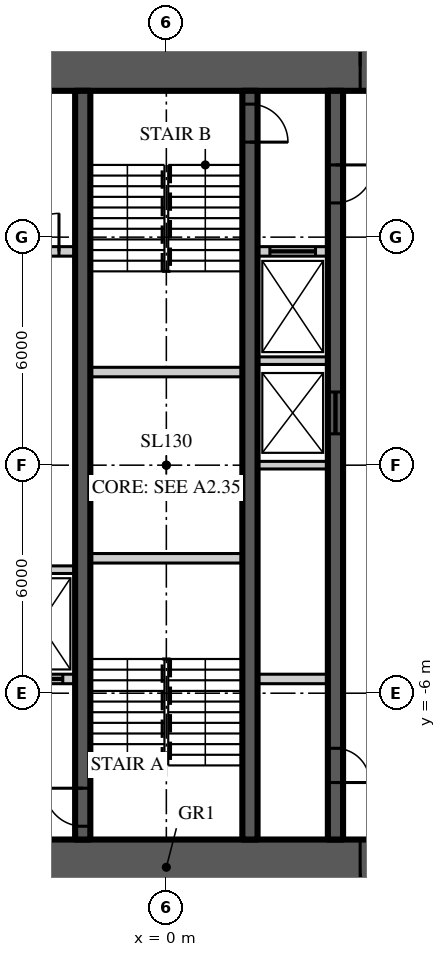
"""IFC4 building model, lengths in metres.
Left out: names, types, materials, properties, quantities, classifications, styles, units other than length and angle.
Written with IfcOpenShell. Run it as: python <this file> out.ifc"""

import sys

from ifc_helpers import new_model, si_unit, direction, frame, frame_2d, origin, place, context, subcontext, project, spatial, rectangle, extrude, element, fill, save


model = new_model("IFC4")
c1 = context("Model", 3, precision=1e-05, world=origin(), true_north=direction((0.0, 1.0)))
c2 = subcontext(c1, "Body", "Model", "MODEL_VIEW")
j1 = project(units=[si_unit("LENGTHUNIT", "METRE"), si_unit("PLANEANGLEUNIT", "RADIAN")], contexts=[c1])
p1 = place(None, origin())
s1 = spatial("IfcSite", under=j1, at=p1, CompositionType="ELEMENT")
p2 = place(p1, origin())
s2 = spatial("IfcBuilding", under=s1, at=p2, CompositionType="ELEMENT")
p3 = place(p2, frame((0.0, 0.0, 271.2)))
s3 = spatial("IfcBuildingStorey", under=s2, at=p3, CompositionType="ELEMENT", Elevation=271.2)
p4 = place(p3, frame((-11.15, 10.5, 0.0), z_axis=(0.0, 0.0, 1.0), x_axis=(1.0, 0.0, 0.0)))
e1 = element("IfcWall", 1, at=p4, inside=s3, PredefinedType="SHEAR", context=c2, shape_type="SweptSolid", body=[
    extrude(rectangle(XDim=22.3, YDim=1.3, at=frame_2d((11.15, 0.0))), origin(), (0.0, 0.0, 1.0), 3.9),
])
p5 = place(p4, frame((4.25, 0.0, 0.0)))
e2 = element("IfcOpeningElement", 2, at=p5, cuts=e1, PredefinedType="OPENING", context=c2, shape_type="SweptSolid", body=[
    extrude(rectangle(XDim=1.8, YDim=2.2, at=frame_2d((0.9, 1.1))), frame((0.0, 0.66, 0.0), z_axis=(0.0, -1.0, 0.0), x_axis=(1.0, 0.0, 0.0)), (0.0, 0.0, 1.0), 1.32),
])
p6 = place(p4, frame((16.25, 0.0, 0.0)))
e3 = element("IfcOpeningElement", 3, at=p6, cuts=e1, PredefinedType="OPENING", context=c2, shape_type="SweptSolid", body=[
    extrude(rectangle(XDim=1.8, YDim=2.2, at=frame_2d((0.9, 1.1))), frame((0.0, 0.66, 0.0), z_axis=(0.0, -1.0, 0.0), x_axis=(1.0, 0.0, 0.0)), (0.0, 0.0, 1.0), 1.32),
])
p7 = place(p3, frame((11.15, -10.5, 0.0), z_axis=(0.0, 0.0, 1.0), x_axis=(-1.0, 0.0, 0.0)))
e4 = element("IfcWall", 4, at=p7, inside=s3, PredefinedType="SHEAR", context=c2, shape_type="SweptSolid", body=[
    extrude(rectangle(XDim=22.3, YDim=1.3, at=frame_2d((11.15, 0.0))), origin(), (0.0, 0.0, 1.0), 3.9),
])
p8 = place(p7, frame((16.25, 0.0, 0.0)))
e5 = element("IfcOpeningElement", 5, at=p8, cuts=e4, PredefinedType="OPENING", context=c2, shape_type="SweptSolid", body=[
    extrude(rectangle(XDim=1.8, YDim=2.2, at=frame_2d((0.9, 1.1))), frame((0.0, 0.66, 0.0), z_axis=(0.0, -1.0, 0.0), x_axis=(1.0, 0.0, 0.0)), (0.0, 0.0, 1.0), 1.32),
])
p9 = place(p7, frame((4.25, 0.0, 0.0)))
e6 = element("IfcOpeningElement", 6, at=p9, cuts=e4, PredefinedType="OPENING", context=c2, shape_type="SweptSolid", body=[
    extrude(rectangle(XDim=1.8, YDim=2.2, at=frame_2d((0.9, 1.1))), frame((0.0, 0.66, 0.0), z_axis=(0.0, -1.0, 0.0), x_axis=(1.0, 0.0, 0.0)), (0.0, 0.0, 1.0), 1.32),
])
p10 = place(p3, frame((4.45, 9.85, 0.0), z_axis=(0.0, 0.0, 1.0), x_axis=(0.0, -1.0, 0.0)))
e7 = element("IfcWall", 7, at=p10, inside=s3, PredefinedType="SHEAR", context=c2, shape_type="SweptSolid", body=[
    extrude(rectangle(XDim=19.7, YDim=0.4, at=frame_2d((9.85, 0.0))), origin(), (0.0, 0.0, 1.0), 3.9),
])
p11 = place(p10, frame((1.95, 0.0, 0.0)))
e8 = element("IfcOpeningElement", 8, at=p11, cuts=e7, PredefinedType="OPENING", context=c2, shape_type="SweptSolid", body=[
    extrude(rectangle(XDim=1.0, YDim=2.2, at=frame_2d((0.5, 1.1))), frame((0.0, 0.21, 0.0), z_axis=(0.0, -1.0, 0.0), x_axis=(1.0, 0.0, 0.0)), (0.0, 0.0, 1.0), 0.42),
])
p12 = place(p10, frame((17.3, 0.0, 0.0)))
e9 = element("IfcOpeningElement", 9, at=p12, cuts=e7, PredefinedType="OPENING", context=c2, shape_type="SweptSolid", body=[
    extrude(rectangle(XDim=0.9, YDim=2.1, at=frame_2d((0.45, 1.05))), frame((0.0, 0.21, 0.0), z_axis=(0.0, -1.0, 0.0), x_axis=(1.0, 0.0, 0.0)), (0.0, 0.0, 1.0), 0.42),
])
p13 = place(p10, frame((7.925, 0.0, 0.0)))
e10 = element("IfcOpeningElement", 10, at=p13, cuts=e7, PredefinedType="OPENING", context=c2, shape_type="SweptSolid", body=[
    extrude(rectangle(XDim=1.1, YDim=2.2, at=frame_2d((0.55, 1.1))), frame((0.0, 0.21, 0.0), z_axis=(0.0, -1.0, 0.0), x_axis=(1.0, 0.0, 0.0)), (0.0, 0.0, 1.0), 0.42),
])
p14 = place(p3, frame((-2.2, -9.85, 0.0), z_axis=(0.0, 0.0, 1.0), x_axis=(0.0, 1.0, 0.0)))
e11 = element("IfcWall", 11, at=p14, inside=s3, PredefinedType="SHEAR", context=c2, shape_type="SweptSolid", body=[
    extrude(rectangle(XDim=19.7, YDim=0.4, at=frame_2d((9.85, 0.0))), origin(), (0.0, 0.0, 1.0), 3.9),
])
p15 = place(p14, frame((0.35, 0.0, 0.0)))
e12 = element("IfcOpeningElement", 12, at=p15, cuts=e11, PredefinedType="OPENING", context=c2, shape_type="SweptSolid", body=[
    extrude(rectangle(XDim=1.0, YDim=2.2, at=frame_2d((0.5, 1.1))), frame((0.0, 0.21, 0.0), z_axis=(0.0, -1.0, 0.0), x_axis=(1.0, 0.0, 0.0)), (0.0, 0.0, 1.0), 0.42),
])
p16 = place(p3, frame((2.2, 9.85, 0.0), z_axis=(0.0, 0.0, 1.0), x_axis=(0.0, -1.0, 0.0)))
e13 = element("IfcWall", 13, at=p16, inside=s3, PredefinedType="SHEAR", context=c2, shape_type="SweptSolid", body=[
    extrude(rectangle(XDim=19.7, YDim=0.4, at=frame_2d((9.85, 0.0))), origin(), (0.0, 0.0, 1.0), 3.9),
])
p17 = place(p16, frame((0.35, 0.0, 0.0)))
e14 = element("IfcOpeningElement", 14, at=p17, cuts=e13, PredefinedType="OPENING", context=c2, shape_type="SweptSolid", body=[
    extrude(rectangle(XDim=1.0, YDim=2.2, at=frame_2d((0.5, 1.1))), frame((0.0, 0.21, 0.0), z_axis=(0.0, -1.0, 0.0), x_axis=(1.0, 0.0, 0.0)), (0.0, 0.0, 1.0), 0.42),
])
p18 = place(p3, frame((-4.25, 5.625, 0.0), z_axis=(0.0, 0.0, 1.0), x_axis=(1.0, 0.0, 0.0)))
e15 = element("IfcWall", 15, at=p18, inside=s3, PredefinedType="SOLIDWALL", context=c2, shape_type="SweptSolid", body=[
    extrude(rectangle(XDim=1.85, YDim=0.25, at=frame_2d((0.925, 0.0))), origin(), (0.0, 0.0, 1.0), 3.7),
])
p19 = place(p18, frame((0.425, 0.0, 0.0)))
e16 = element("IfcOpeningElement", 16, at=p19, cuts=e15, PredefinedType="OPENING", context=c2, shape_type="SweptSolid", body=[
    extrude(rectangle(XDim=1.0, YDim=2.2, at=frame_2d((0.5, 1.1))), frame((0.0, 0.135, 0.0), z_axis=(0.0, -1.0, 0.0), x_axis=(1.0, 0.0, 0.0)), (0.0, 0.0, 1.0), 0.27),
])
p20 = place(p3, frame((2.4, 5.625, 0.0), z_axis=(0.0, 0.0, 1.0), x_axis=(1.0, 0.0, 0.0)))
e17 = element("IfcWall", 17, at=p20, inside=s3, PredefinedType="SOLIDWALL", context=c2, shape_type="SweptSolid", body=[
    extrude(rectangle(XDim=1.85, YDim=0.25, at=frame_2d((0.925, 0.0))), origin(), (0.0, 0.0, 1.0), 3.7),
])
p21 = place(p20, frame((0.325, 0.0, 0.0)))
e18 = element("IfcOpeningElement", 18, at=p21, cuts=e17, PredefinedType="OPENING", context=c2, shape_type="SweptSolid", body=[
    extrude(rectangle(XDim=1.2, YDim=2.2, at=frame_2d((0.6, 1.1))), frame((0.0, 0.135, 0.0), z_axis=(0.0, -1.0, 0.0), x_axis=(1.0, 0.0, 0.0)), (0.0, 0.0, 1.0), 0.27),
])
p22 = place(p3, frame((-4.25, -5.625, 0.0), z_axis=(0.0, 0.0, 1.0), x_axis=(1.0, 0.0, 0.0)))
e19 = element("IfcWall", 19, at=p22, inside=s3, PredefinedType="SOLIDWALL", context=c2, shape_type="SweptSolid", body=[
    extrude(rectangle(XDim=1.85, YDim=0.25, at=frame_2d((0.925, 0.0))), origin(), (0.0, 0.0, 1.0), 3.7),
])
p23 = place(p22, frame((0.325, 0.0, 0.0)))
e20 = element("IfcOpeningElement", 20, at=p23, cuts=e19, PredefinedType="OPENING", context=c2, shape_type="SweptSolid", body=[
    extrude(rectangle(XDim=1.2, YDim=2.2, at=frame_2d((0.6, 1.1))), frame((0.0, 0.135, 0.0), z_axis=(0.0, -1.0, 0.0), x_axis=(1.0, 0.0, 0.0)), (0.0, 0.0, 1.0), 0.27),
])
p24 = place(p3, frame((2.4, -5.625, 0.0), z_axis=(0.0, 0.0, 1.0), x_axis=(1.0, 0.0, 0.0)))
e21 = element("IfcWall", 21, at=p24, inside=s3, PredefinedType="SOLIDWALL", context=c2, shape_type="SweptSolid", body=[
    extrude(rectangle(XDim=1.85, YDim=0.25, at=frame_2d((0.925, 0.0))), origin(), (0.0, 0.0, 1.0), 3.7),
])
for number, where, z_axis, x_axis in (
    (22, (-2.0, -2.45, 0.0), (0.0, 0.0, 1.0), (1.0, 0.0, 0.0)),
    (23, (-2.0, 2.45, 0.0), (0.0, 0.0, 1.0), (1.0, 0.0, 0.0)),
):
    element("IfcWall", number, at=place(p3, frame(where, z_axis=z_axis, x_axis=x_axis)), inside=s3, PredefinedType="SOLIDWALL", context=c2, shape_type="SweptSolid", body=[
        extrude(rectangle(XDim=4.0, YDim=0.25, at=frame_2d((2.0, 0.0))), origin(), (0.0, 0.0, 1.0), 3.7),
    ])
for number, where, z_axis, x_axis in (
    (24, (-4.25, -2.75, 0.0), (0.0, 0.0, 1.0), (1.0, 0.0, 0.0)),
    (25, (2.4, 0.0, 0.0), (0.0, 0.0, 1.0), (1.0, 0.0, 0.0)),
    (26, (2.4, 2.75, 0.0), (0.0, 0.0, 1.0), (1.0, 0.0, 0.0)),
):
    element("IfcWall", number, at=place(p3, frame(where, z_axis=z_axis, x_axis=x_axis)), inside=s3, PredefinedType="SOLIDWALL", context=c2, shape_type="SweptSolid", body=[
        extrude(rectangle(XDim=1.85, YDim=0.2, at=frame_2d((0.925, 0.0))), origin(), (0.0, 0.0, 1.0), 3.7),
    ])
p25 = place(p6, origin())
e27 = element("IfcDoor", 27, at=p25, inside=s3, OperationType="DOUBLE_DOOR_DOUBLE_SWING", PredefinedType="DOOR", context=c2, shape_type="SweptSolid", body=[
    extrude(rectangle(XDim=1.8, YDim=2.2, at=frame_2d((0.9, 1.1))), frame((0.0, 0.025, 0.0), z_axis=(0.0, -1.0, 0.0), x_axis=(1.0, 0.0, 0.0)), (0.0, 0.0, 1.0), 0.05),
])
fill(e3, e27)
p26 = place(p9, origin())
e28 = element("IfcDoor", 28, at=p26, inside=s3, OperationType="DOUBLE_DOOR_DOUBLE_SWING", PredefinedType="DOOR", context=c2, shape_type="SweptSolid", body=[
    extrude(rectangle(XDim=1.8, YDim=2.2, at=frame_2d((0.9, 1.1))), frame((0.0, 0.025, 0.0), z_axis=(0.0, -1.0, 0.0), x_axis=(1.0, 0.0, 0.0)), (0.0, 0.0, 1.0), 0.05),
])
fill(e6, e28)
p27 = place(p15, origin())
e29 = element("IfcDoor", 29, at=p27, inside=s3, OperationType="SINGLE_SWING_RIGHT", PredefinedType="DOOR", context=c2, shape_type="SweptSolid", body=[
    extrude(rectangle(XDim=1.0, YDim=2.2, at=frame_2d((0.5, 1.1))), frame((0.0, 0.025, 0.0), z_axis=(0.0, -1.0, 0.0), x_axis=(1.0, 0.0, 0.0)), (0.0, 0.0, 1.0), 0.05),
])
fill(e12, e29)
p28 = place(p11, origin())
e30 = element("IfcDoor", 30, at=p28, inside=s3, OperationType="SINGLE_SWING_LEFT", PredefinedType="DOOR", context=c2, shape_type="SweptSolid", body=[
    extrude(rectangle(XDim=1.0, YDim=2.2, at=frame_2d((0.5, 1.1))), frame((0.0, 0.025, 0.0), z_axis=(0.0, -1.0, 0.0), x_axis=(1.0, 0.0, 0.0)), (0.0, 0.0, 1.0), 0.05),
])
fill(e8, e30)
p29 = place(p17, origin())
e31 = element("IfcDoor", 31, at=p29, inside=s3, OperationType="SINGLE_SWING_RIGHT", PredefinedType="DOOR", context=c2, shape_type="SweptSolid", body=[
    extrude(rectangle(XDim=1.0, YDim=2.2, at=frame_2d((0.5, 1.1))), frame((0.0, 0.025, 0.0), z_axis=(0.0, -1.0, 0.0), x_axis=(1.0, 0.0, 0.0)), (0.0, 0.0, 1.0), 0.05),
])
fill(e14, e31)
p30 = place(p12, origin())
e32 = element("IfcDoor", 32, at=p30, inside=s3, OperationType="SINGLE_SWING_RIGHT", PredefinedType="DOOR", context=c2, shape_type="SweptSolid", body=[
    extrude(rectangle(XDim=0.9, YDim=2.1, at=frame_2d((0.45, 1.05))), frame((0.0, 0.025, 0.0), z_axis=(0.0, -1.0, 0.0), x_axis=(1.0, 0.0, 0.0)), (0.0, 0.0, 1.0), 0.05),
])
fill(e9, e32)
p31 = place(p13, origin())
e33 = element("IfcDoor", 33, at=p31, inside=s3, OperationType="SLIDING_TO_LEFT", PredefinedType="DOOR", context=c2, shape_type="SweptSolid", body=[
    extrude(rectangle(XDim=1.1, YDim=2.2, at=frame_2d((0.55, 1.1))), frame((0.0, 0.025, 0.0), z_axis=(0.0, -1.0, 0.0), x_axis=(1.0, 0.0, 0.0)), (0.0, 0.0, 1.0), 0.05),
])
fill(e10, e33)
p32 = place(p23, origin())
e34 = element("IfcDoor", 34, at=p32, inside=s3, OperationType="SLIDING_TO_LEFT", PredefinedType="DOOR", context=c2, shape_type="SweptSolid", body=[
    extrude(rectangle(XDim=1.2, YDim=2.2, at=frame_2d((0.6, 1.1))), frame((0.0, 0.025, 0.0), z_axis=(0.0, -1.0, 0.0), x_axis=(1.0, 0.0, 0.0)), (0.0, 0.0, 1.0), 0.05),
])
fill(e20, e34)
p33 = place(p21, origin())
e35 = element("IfcDoor", 35, at=p33, inside=s3, OperationType="SLIDING_TO_LEFT", PredefinedType="DOOR", context=c2, shape_type="SweptSolid", body=[
    extrude(rectangle(XDim=1.2, YDim=2.2, at=frame_2d((0.6, 1.1))), frame((0.0, 0.025, 0.0), z_axis=(0.0, -1.0, 0.0), x_axis=(1.0, 0.0, 0.0)), (0.0, 0.0, 1.0), 0.05),
])
fill(e18, e35)
p34 = place(p19, origin())
e36 = element("IfcDoor", 36, at=p34, inside=s3, OperationType="SINGLE_SWING_RIGHT", PredefinedType="DOOR", context=c2, shape_type="SweptSolid", body=[
    extrude(rectangle(XDim=1.0, YDim=2.2, at=frame_2d((0.5, 1.1))), frame((0.0, 0.025, 0.0), z_axis=(0.0, -1.0, 0.0), x_axis=(1.0, 0.0, 0.0)), (0.0, 0.0, 1.0), 0.05),
])
fill(e16, e36)
save(model, sys.argv[1])
